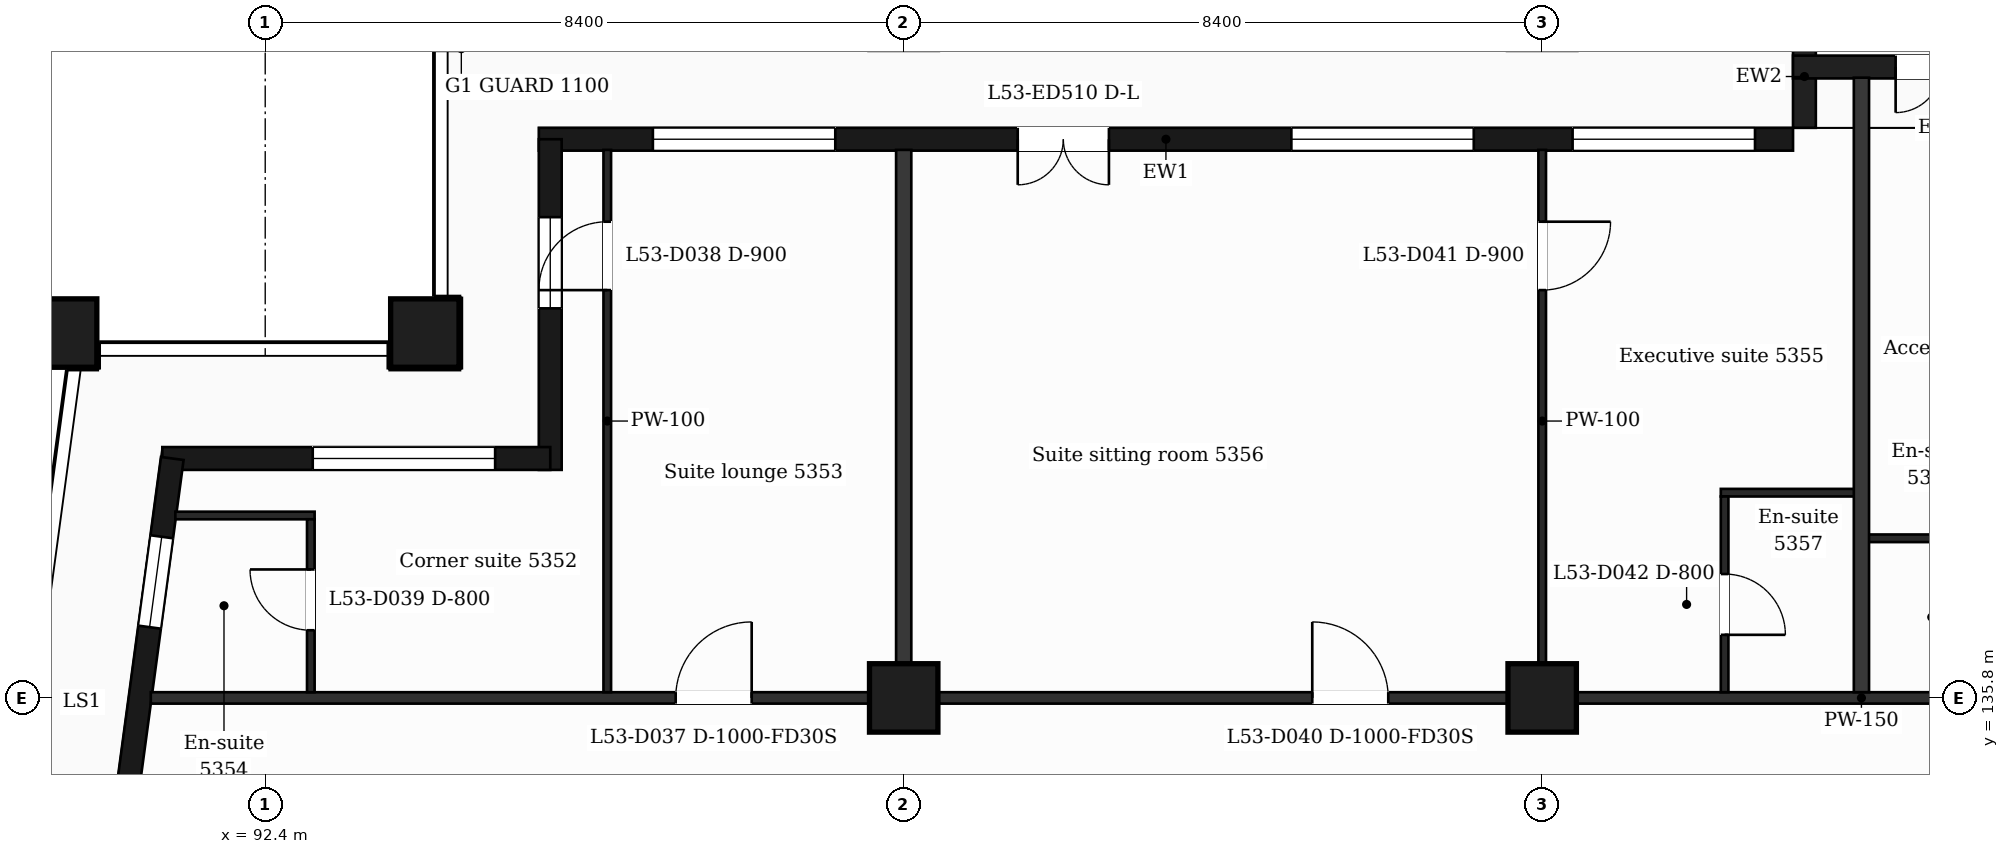
"""IFC4 building model, lengths in metres.
Left out: names, types, materials, properties, quantities, classifications, styles, units other than length and angle.
Written with IfcOpenShell. Run it as: python <this file> out.ifc"""

import sys

from ifc_helpers import new_model, si_unit, direction, frame, frame_2d, origin, origin_2d, place, context, subcontext, project, spatial, rectangle, extrude, element, fill, save


model = new_model("IFC4")
c1 = context("Model", 3, precision=1e-05, world=origin(), true_north=direction((0.0, 1.0)))
c2 = subcontext(c1, "Body", "Model", "MODEL_VIEW")
j1 = project(units=[si_unit("LENGTHUNIT", "METRE"), si_unit("PLANEANGLEUNIT", "RADIAN")], contexts=[c1])
p1 = place(None, origin())
s1 = spatial("IfcSite", under=j1, at=p1, CompositionType="ELEMENT")
p2 = place(p1, origin())
s2 = spatial("IfcBuilding", under=s1, at=p2, CompositionType="ELEMENT")
p3 = place(p2, frame((0.0, 0.0, 220.7)))
s3 = spatial("IfcBuildingStorey", under=s2, at=p3, CompositionType="ELEMENT", Elevation=220.7)
for number, where, z_axis, x_axis in (
    (1, (94.5, 140.6, 0.0), (0.0, 0.0, 1.0), (1.0, 0.0, 0.0)),
    (2, (89.735, 140.6, 0.0), (0.0, 0.0, 1.0), (1.0, 0.0, 0.0)),
    (3, (100.8, 135.8, 0.0), (0.0, 0.0, 1.0), (1.0, 0.0, 0.0)),
    (4, (109.2, 135.8, 0.0), (0.0, 0.0, 1.0), (1.0, 0.0, 0.0)),
):
    element("IfcColumn", number, at=place(p3, frame(where, z_axis=z_axis, x_axis=x_axis)), inside=s3, PredefinedType="COLUMN", context=c2, shape_type="SweptSolid", body=[
        extrude(rectangle(XDim=0.9, YDim=0.9, at=origin_2d()), origin(), (0.0, 0.0, 1.0), 3.7),
    ])
p4 = place(p3, frame((112.5, 143.15, 0.0), z_axis=(0.0, 0.0, 1.0), x_axis=(-1.0, 0.0, 0.0)))
e5 = element("IfcWall", 5, at=p4, inside=s3, PredefinedType="SOLIDWALL", context=c2, shape_type="SweptSolid", body=[
    extrude(rectangle(XDim=16.5, YDim=0.3, at=frame_2d((8.25, 0.0))), origin(), (0.0, 0.0, 1.0), 3.38),
])
p5 = place(p4, frame((0.5, 0.0, 0.9)))
e6 = element("IfcOpeningElement", 6, at=p5, cuts=e5, PredefinedType="OPENING", context=c2, shape_type="SweptSolid", body=[
    extrude(rectangle(XDim=2.4, YDim=2.1, at=frame_2d((1.2, 1.05))), frame((0.0, 0.16, 0.0), z_axis=(0.0, -1.0, 0.0), x_axis=(1.0, 0.0, 0.0)), (0.0, 0.0, 1.0), 0.32),
])
p6 = place(p4, frame((4.2, 0.0, 0.9)))
e7 = element("IfcOpeningElement", 7, at=p6, cuts=e5, PredefinedType="OPENING", context=c2, shape_type="SweptSolid", body=[
    extrude(rectangle(XDim=2.4, YDim=2.1, at=frame_2d((1.2, 1.05))), frame((0.0, 0.16, 0.0), z_axis=(0.0, -1.0, 0.0), x_axis=(1.0, 0.0, 0.0)), (0.0, 0.0, 1.0), 0.32),
])
p7 = place(p4, frame((9.0, 0.0, 0.0)))
e8 = element("IfcOpeningElement", 8, at=p7, cuts=e5, PredefinedType="OPENING", context=c2, shape_type="SweptSolid", body=[
    extrude(rectangle(XDim=1.2, YDim=2.4, at=frame_2d((0.6, 1.2))), frame((0.0, 0.16, 0.0), z_axis=(0.0, -1.0, 0.0), x_axis=(1.0, 0.0, 0.0)), (0.0, 0.0, 1.0), 0.32),
])
p8 = place(p4, frame((12.6, 0.0, 0.9)))
e9 = element("IfcOpeningElement", 9, at=p8, cuts=e5, PredefinedType="OPENING", context=c2, shape_type="SweptSolid", body=[
    extrude(rectangle(XDim=2.4, YDim=2.1, at=frame_2d((1.2, 1.05))), frame((0.0, 0.16, 0.0), z_axis=(0.0, -1.0, 0.0), x_axis=(1.0, 0.0, 0.0)), (0.0, 0.0, 1.0), 0.32),
])
p9 = place(p3, frame((112.65, 143.3, 0.0), z_axis=(0.0, 0.0, 1.0), x_axis=(0.0, 1.0, 0.0)))
e10 = element("IfcWall", 10, at=p9, inside=s3, PredefinedType="SOLIDWALL", context=c2, shape_type="SweptSolid", body=[
    extrude(rectangle(XDim=1.35, YDim=0.3, at=frame_2d((0.675, 0.0))), origin(), (0.0, 0.0, 1.0), 3.38),
])
p10 = place(p3, frame((116.4, 144.1, 0.0), z_axis=(0.0, 0.0, 1.0), x_axis=(-1.0, 0.0, 0.0)))
e11 = element("IfcWall", 11, at=p10, inside=s3, PredefinedType="SOLIDWALL", context=c2, shape_type="SweptSolid", body=[
    extrude(rectangle(XDim=3.9, YDim=0.3, at=frame_2d((1.95, 0.0))), origin(), (0.0, 0.0, 1.0), 3.38),
])
p11 = place(p10, frame((1.35, 0.0, 0.0)))
e12 = element("IfcOpeningElement", 12, at=p11, cuts=e11, PredefinedType="OPENING", context=c2, shape_type="SweptSolid", body=[
    extrude(rectangle(XDim=1.2, YDim=2.4, at=frame_2d((0.6, 1.2))), frame((0.0, 0.16, 0.0), z_axis=(0.0, -1.0, 0.0), x_axis=(1.0, 0.0, 0.0)), (0.0, 0.0, 1.0), 0.32),
])
p12 = place(p3, frame((96.15, 143.15, 0.0), z_axis=(0.0, 0.0, 1.0), x_axis=(0.0, -1.0, 0.0)))
e13 = element("IfcWall", 13, at=p12, inside=s3, PredefinedType="SOLIDWALL", context=c2, shape_type="SweptSolid", body=[
    extrude(rectangle(XDim=4.35, YDim=0.3, at=frame_2d((2.175, 0.0))), origin(), (0.0, 0.0, 1.0), 3.38),
])
p13 = place(p12, frame((1.025, 0.0, 0.9)))
e14 = element("IfcOpeningElement", 14, at=p13, cuts=e13, PredefinedType="OPENING", context=c2, shape_type="SweptSolid", body=[
    extrude(rectangle(XDim=1.2, YDim=2.1, at=frame_2d((0.6, 1.05))), frame((0.0, 0.16, 0.0), z_axis=(0.0, -1.0, 0.0), x_axis=(1.0, 0.0, 0.0)), (0.0, 0.0, 1.0), 0.32),
])
p14 = place(p3, frame((96.15, 138.95, 0.0), z_axis=(0.0, 0.0, 1.0), x_axis=(-1.0, 0.0, 0.0)))
e15 = element("IfcWall", 15, at=p14, inside=s3, PredefinedType="SOLIDWALL", context=c2, shape_type="SweptSolid", body=[
    extrude(rectangle(XDim=5.104, YDim=0.3, at=frame_2d((2.552, 0.0))), origin(), (0.0, 0.0, 1.0), 3.38),
])
p15 = place(p14, frame((0.725, 0.0, 0.9)))
e16 = element("IfcOpeningElement", 16, at=p15, cuts=e15, PredefinedType="OPENING", context=c2, shape_type="SweptSolid", body=[
    extrude(rectangle(XDim=2.4, YDim=2.1, at=frame_2d((1.2, 1.05))), frame((0.0, 0.16, 0.0), z_axis=(0.0, -1.0, 0.0), x_axis=(1.0, 0.0, 0.0)), (0.0, 0.0, 1.0), 0.32),
])
p16 = place(p3, frame((91.177, 138.95, 0.0), z_axis=(0.0, 0.0, 1.0), x_axis=(-0.133426664613, -0.991058689065, 0.0)))
e17 = element("IfcWall", 17, at=p16, inside=s3, PredefinedType="SOLIDWALL", context=c2, shape_type="SweptSolid", body=[
    extrude(rectangle(XDim=6.609, YDim=0.3, at=frame_2d((3.305, 0.0))), origin(), (0.0, 0.0, 1.0), 3.38),
])
p17 = place(p16, frame((1.039, 0.0, 0.9)))
e18 = element("IfcOpeningElement", 18, at=p17, cuts=e17, PredefinedType="OPENING", context=c2, shape_type="SweptSolid", body=[
    extrude(rectangle(XDim=1.2, YDim=2.1, at=frame_2d((0.6, 1.05))), frame((0.0, 0.16, 0.0), z_axis=(0.0, -1.0, 0.0), x_axis=(1.0, 0.0, 0.0)), (0.0, 0.0, 1.0), 0.32),
])
p18 = place(p16, frame((4.294, 0.0, 0.0)))
e19 = element("IfcOpeningElement", 19, at=p18, cuts=e17, PredefinedType="OPENING", context=c2, shape_type="SweptSolid", body=[
    extrude(rectangle(XDim=1.2, YDim=2.4, at=frame_2d((0.6, 1.2))), frame((0.0, 0.16, 0.0), z_axis=(0.0, -1.0, 0.0), x_axis=(1.0, 0.0, 0.0)), (0.0, 0.0, 1.0), 0.32),
])
p19 = place(p3, frame((90.895, 135.8, 0.0), z_axis=(0.0, 0.0, 1.0), x_axis=(1.0, 0.0, 0.0)))
e20 = element("IfcWall", 20, at=p19, inside=s3, PredefinedType="PARTITIONING", context=c2, shape_type="SweptSolid", body=[
    extrude(rectangle(XDim=45.011, YDim=0.15, at=frame_2d((22.505, 0.0))), origin(), (0.0, 0.0, 1.0), 3.38),
])
p20 = place(p19, frame((6.906, 0.0, 0.0)))
e21 = element("IfcOpeningElement", 21, at=p20, cuts=e20, PredefinedType="OPENING", context=c2, shape_type="SweptSolid", body=[
    extrude(rectangle(XDim=1.0, YDim=2.1, at=frame_2d((0.5, 1.05))), frame((0.0, 0.085, 0.0), z_axis=(0.0, -1.0, 0.0), x_axis=(1.0, 0.0, 0.0)), (0.0, 0.0, 1.0), 0.17),
])
p21 = place(p19, frame((15.281, 0.0, 0.0)))
e22 = element("IfcOpeningElement", 22, at=p21, cuts=e20, PredefinedType="OPENING", context=c2, shape_type="SweptSolid", body=[
    extrude(rectangle(XDim=1.0, YDim=2.1, at=frame_2d((0.5, 1.05))), frame((0.0, 0.085, 0.0), z_axis=(0.0, -1.0, 0.0), x_axis=(1.0, 0.0, 0.0)), (0.0, 0.0, 1.0), 0.17),
])
p22 = place(p19, frame((25.045, 0.0, 0.0)))
e23 = element("IfcOpeningElement", 23, at=p22, cuts=e20, PredefinedType="OPENING", context=c2, shape_type="SweptSolid", body=[
    extrude(rectangle(XDim=1.0, YDim=2.1, at=frame_2d((0.5, 1.05))), frame((0.0, 0.085, 0.0), z_axis=(0.0, -1.0, 0.0), x_axis=(1.0, 0.0, 0.0)), (0.0, 0.0, 1.0), 0.17),
])
p23 = place(p19, frame((29.531, 0.0, 0.0)))
e24 = element("IfcOpeningElement", 24, at=p23, cuts=e20, PredefinedType="OPENING", context=c2, shape_type="SweptSolid", body=[
    extrude(rectangle(XDim=0.95, YDim=2.1, at=frame_2d((0.475, 1.05))), frame((0.0, 0.085, 0.0), z_axis=(0.0, -1.0, 0.0), x_axis=(1.0, 0.0, 0.0)), (0.0, 0.0, 1.0), 0.17),
])
p24 = place(p19, frame((36.906, 0.0, 0.0)))
e25 = element("IfcOpeningElement", 25, at=p24, cuts=e20, PredefinedType="OPENING", context=c2, shape_type="SweptSolid", body=[
    extrude(rectangle(XDim=1.0, YDim=2.1, at=frame_2d((0.5, 1.05))), frame((0.0, 0.085, 0.0), z_axis=(0.0, -1.0, 0.0), x_axis=(1.0, 0.0, 0.0)), (0.0, 0.0, 1.0), 0.17),
])
p25 = place(p3, frame((113.4, 137.9, 0.0), z_axis=(0.0, 0.0, 1.0), x_axis=(1.0, 0.0, 0.0)))
e26 = element("IfcWall", 26, at=p25, inside=s3, PredefinedType="PARTITIONING", context=c2, shape_type="SweptSolid", body=[
    extrude(rectangle(XDim=1.85, YDim=0.1, at=frame_2d((0.925, 0.0))), origin(), (0.0, 0.0, 1.0), 3.38),
])
p26 = place(p3, frame((91.218, 138.2, 0.0), z_axis=(0.0, 0.0, 1.0), x_axis=(1.0, 0.0, 0.0)))
e27 = element("IfcWall", 27, at=p26, inside=s3, PredefinedType="PARTITIONING", context=c2, shape_type="SweptSolid", body=[
    extrude(rectangle(XDim=1.832, YDim=0.1, at=frame_2d((0.916, 0.0))), origin(), (0.0, 0.0, 1.0), 3.38),
])
p27 = place(p3, frame((111.55, 138.5, 0.0), z_axis=(0.0, 0.0, 1.0), x_axis=(1.0, 0.0, 0.0)))
e28 = element("IfcWall", 28, at=p27, inside=s3, PredefinedType="PARTITIONING", context=c2, shape_type="SweptSolid", body=[
    extrude(rectangle(XDim=1.85, YDim=0.1, at=frame_2d((0.925, 0.0))), origin(), (0.0, 0.0, 1.0), 3.38),
])
p28 = place(p3, frame((93.0, 135.875, 0.0), z_axis=(0.0, 0.0, 1.0), x_axis=(0.0, 1.0, 0.0)))
e29 = element("IfcWall", 29, at=p28, inside=s3, PredefinedType="PARTITIONING", context=c2, shape_type="SweptSolid", body=[
    extrude(rectangle(XDim=2.275, YDim=0.1, at=frame_2d((1.137, 0.0))), origin(), (0.0, 0.0, 1.0), 3.38),
])
p29 = place(p28, frame((0.815, 0.0, 0.0)))
e30 = element("IfcOpeningElement", 30, at=p29, cuts=e29, PredefinedType="OPENING", context=c2, shape_type="SweptSolid", body=[
    extrude(rectangle(XDim=0.8, YDim=2.1, at=frame_2d((0.4, 1.05))), frame((0.0, 0.06, 0.0), z_axis=(0.0, -1.0, 0.0), x_axis=(1.0, 0.0, 0.0)), (0.0, 0.0, 1.0), 0.12),
])
p30 = place(p3, frame((96.9, 135.875, 0.0), z_axis=(0.0, 0.0, 1.0), x_axis=(0.0, 1.0, 0.0)))
e31 = element("IfcWall", 31, at=p30, inside=s3, PredefinedType="PARTITIONING", context=c2, shape_type="SweptSolid", body=[
    extrude(rectangle(XDim=7.135, YDim=0.1, at=frame_2d((3.567, 0.0))), origin(), (0.0, 0.0, 1.0), 3.38),
])
p31 = place(p30, frame((5.29, 0.0, 0.0)))
e32 = element("IfcOpeningElement", 32, at=p31, cuts=e31, PredefinedType="OPENING", context=c2, shape_type="SweptSolid", body=[
    extrude(rectangle(XDim=0.9, YDim=2.1, at=frame_2d((0.45, 1.05))), frame((0.0, 0.06, 0.0), z_axis=(0.0, -1.0, 0.0), x_axis=(1.0, 0.0, 0.0)), (0.0, 0.0, 1.0), 0.12),
])
p32 = place(p3, frame((100.8, 135.875, 0.0), z_axis=(0.0, 0.0, 1.0), x_axis=(0.0, 1.0, 0.0)))
e33 = element("IfcWall", 33, at=p32, inside=s3, PredefinedType="PARTITIONING", context=c2, shape_type="SweptSolid", body=[
    extrude(rectangle(XDim=7.135, YDim=0.2, at=frame_2d((3.567, 0.0))), origin(), (0.0, 0.0, 1.0), 3.38),
])
p33 = place(p3, frame((109.2, 135.875, 0.0), z_axis=(0.0, 0.0, 1.0), x_axis=(0.0, 1.0, 0.0)))
e34 = element("IfcWall", 34, at=p33, inside=s3, PredefinedType="PARTITIONING", context=c2, shape_type="SweptSolid", body=[
    extrude(rectangle(XDim=7.135, YDim=0.1, at=frame_2d((3.567, 0.0))), origin(), (0.0, 0.0, 1.0), 3.38),
])
p34 = place(p33, frame((5.29, 0.0, 0.0)))
e35 = element("IfcOpeningElement", 35, at=p34, cuts=e34, PredefinedType="OPENING", context=c2, shape_type="SweptSolid", body=[
    extrude(rectangle(XDim=0.9, YDim=2.1, at=frame_2d((0.45, 1.05))), frame((0.0, 0.06, 0.0), z_axis=(0.0, -1.0, 0.0), x_axis=(1.0, 0.0, 0.0)), (0.0, 0.0, 1.0), 0.12),
])
p35 = place(p3, frame((111.6, 135.875, 0.0), z_axis=(0.0, 0.0, 1.0), x_axis=(0.0, 1.0, 0.0)))
e36 = element("IfcWall", 36, at=p35, inside=s3, PredefinedType="PARTITIONING", context=c2, shape_type="SweptSolid", body=[
    extrude(rectangle(XDim=2.575, YDim=0.1, at=frame_2d((1.288, 0.0))), origin(), (0.0, 0.0, 1.0), 3.38),
])
p36 = place(p35, frame((0.755, 0.0, 0.0)))
e37 = element("IfcOpeningElement", 37, at=p36, cuts=e36, PredefinedType="OPENING", context=c2, shape_type="SweptSolid", body=[
    extrude(rectangle(XDim=0.8, YDim=2.1, at=frame_2d((0.4, 1.05))), frame((0.0, 0.06, 0.0), z_axis=(0.0, -1.0, 0.0), x_axis=(1.0, 0.0, 0.0)), (0.0, 0.0, 1.0), 0.12),
])
p37 = place(p3, frame((113.4, 135.875, 0.0), z_axis=(0.0, 0.0, 1.0), x_axis=(0.0, 1.0, 0.0)))
e38 = element("IfcWall", 38, at=p37, inside=s3, PredefinedType="PARTITIONING", context=c2, shape_type="SweptSolid", body=[
    extrude(rectangle(XDim=8.085, YDim=0.2, at=frame_2d((4.042, 0.0))), origin(), (0.0, 0.0, 1.0), 3.38),
])
p38 = place(p5, origin())
e39 = element("IfcWindow", 39, at=p38, inside=s3, PartitioningType="SINGLE_PANEL", PredefinedType="WINDOW", context=c2, shape_type="SweptSolid", body=[
    extrude(rectangle(XDim=2.4, YDim=2.1, at=frame_2d((1.2, 1.05))), frame((0.0, 0.03, 0.0), z_axis=(0.0, -1.0, 0.0), x_axis=(1.0, 0.0, 0.0)), (0.0, 0.0, 1.0), 0.06),
])
fill(e6, e39)
p39 = place(p6, origin())
e40 = element("IfcWindow", 40, at=p39, inside=s3, PartitioningType="SINGLE_PANEL", PredefinedType="WINDOW", context=c2, shape_type="SweptSolid", body=[
    extrude(rectangle(XDim=2.4, YDim=2.1, at=frame_2d((1.2, 1.05))), frame((0.0, 0.03, 0.0), z_axis=(0.0, -1.0, 0.0), x_axis=(1.0, 0.0, 0.0)), (0.0, 0.0, 1.0), 0.06),
])
fill(e7, e40)
p40 = place(p7, origin())
e41 = element("IfcDoor", 41, at=p40, inside=s3, OperationType="DOUBLE_DOOR_SINGLE_SWING", PredefinedType="DOOR", context=c2, shape_type="SweptSolid", body=[
    extrude(rectangle(XDim=1.2, YDim=2.4, at=frame_2d((0.6, 1.2))), frame((0.0, 0.025, 0.0), z_axis=(0.0, -1.0, 0.0), x_axis=(1.0, 0.0, 0.0)), (0.0, 0.0, 1.0), 0.05),
])
fill(e8, e41)
p41 = place(p8, origin())
e42 = element("IfcWindow", 42, at=p41, inside=s3, PartitioningType="SINGLE_PANEL", PredefinedType="WINDOW", context=c2, shape_type="SweptSolid", body=[
    extrude(rectangle(XDim=2.4, YDim=2.1, at=frame_2d((1.2, 1.05))), frame((0.0, 0.03, 0.0), z_axis=(0.0, -1.0, 0.0), x_axis=(1.0, 0.0, 0.0)), (0.0, 0.0, 1.0), 0.06),
])
fill(e9, e42)
p42 = place(p11, origin())
e43 = element("IfcDoor", 43, at=p42, inside=s3, OperationType="DOUBLE_DOOR_SINGLE_SWING", PredefinedType="DOOR", context=c2, shape_type="SweptSolid", body=[
    extrude(rectangle(XDim=1.2, YDim=2.4, at=frame_2d((0.6, 1.2))), frame((0.0, 0.025, 0.0), z_axis=(0.0, -1.0, 0.0), x_axis=(1.0, 0.0, 0.0)), (0.0, 0.0, 1.0), 0.05),
])
fill(e12, e43)
p43 = place(p13, origin())
e44 = element("IfcWindow", 44, at=p43, inside=s3, PartitioningType="SINGLE_PANEL", PredefinedType="WINDOW", context=c2, shape_type="SweptSolid", body=[
    extrude(rectangle(XDim=1.2, YDim=2.1, at=frame_2d((0.6, 1.05))), frame((0.0, 0.03, 0.0), z_axis=(0.0, -1.0, 0.0), x_axis=(1.0, 0.0, 0.0)), (0.0, 0.0, 1.0), 0.06),
])
fill(e14, e44)
p44 = place(p15, origin())
e45 = element("IfcWindow", 45, at=p44, inside=s3, PartitioningType="SINGLE_PANEL", PredefinedType="WINDOW", context=c2, shape_type="SweptSolid", body=[
    extrude(rectangle(XDim=2.4, YDim=2.1, at=frame_2d((1.2, 1.05))), frame((0.0, 0.03, 0.0), z_axis=(0.0, -1.0, 0.0), x_axis=(1.0, 0.0, 0.0)), (0.0, 0.0, 1.0), 0.06),
])
fill(e16, e45)
p45 = place(p17, origin())
e46 = element("IfcWindow", 46, at=p45, inside=s3, PartitioningType="SINGLE_PANEL", PredefinedType="WINDOW", context=c2, shape_type="SweptSolid", body=[
    extrude(rectangle(XDim=1.2, YDim=2.1, at=frame_2d((0.6, 1.05))), frame((0.0, 0.03, 0.0), z_axis=(0.0, -1.0, 0.0), x_axis=(1.0, 0.0, 0.0)), (0.0, 0.0, 1.0), 0.06),
])
fill(e18, e46)
p46 = place(p20, origin())
e47 = element("IfcDoor", 47, at=p46, inside=s3, OperationType="SINGLE_SWING_RIGHT", PredefinedType="DOOR", context=c2, shape_type="SweptSolid", body=[
    extrude(rectangle(XDim=1.0, YDim=2.1, at=frame_2d((0.5, 1.05))), frame((0.0, 0.025, 0.0), z_axis=(0.0, -1.0, 0.0), x_axis=(1.0, 0.0, 0.0)), (0.0, 0.0, 1.0), 0.05),
])
fill(e21, e47)
p47 = place(p31, origin())
e48 = element("IfcDoor", 48, at=p47, inside=s3, OperationType="SINGLE_SWING_LEFT", PredefinedType="DOOR", context=c2, shape_type="SweptSolid", body=[
    extrude(rectangle(XDim=0.9, YDim=2.1, at=frame_2d((0.45, 1.05))), frame((0.0, 0.025, 0.0), z_axis=(0.0, -1.0, 0.0), x_axis=(1.0, 0.0, 0.0)), (0.0, 0.0, 1.0), 0.05),
])
fill(e32, e48)
p48 = place(p29, origin())
e49 = element("IfcDoor", 49, at=p48, inside=s3, OperationType="SINGLE_SWING_RIGHT", PredefinedType="DOOR", context=c2, shape_type="SweptSolid", body=[
    extrude(rectangle(XDim=0.8, YDim=2.1, at=frame_2d((0.4, 1.05))), frame((0.0, 0.025, 0.0), z_axis=(0.0, -1.0, 0.0), x_axis=(1.0, 0.0, 0.0)), (0.0, 0.0, 1.0), 0.05),
])
fill(e30, e49)
p49 = place(p21, origin())
e50 = element("IfcDoor", 50, at=p49, inside=s3, OperationType="SINGLE_SWING_LEFT", PredefinedType="DOOR", context=c2, shape_type="SweptSolid", body=[
    extrude(rectangle(XDim=1.0, YDim=2.1, at=frame_2d((0.5, 1.05))), frame((0.0, 0.025, 0.0), z_axis=(0.0, -1.0, 0.0), x_axis=(1.0, 0.0, 0.0)), (0.0, 0.0, 1.0), 0.05),
])
fill(e22, e50)
p50 = place(p34, origin())
e51 = element("IfcDoor", 51, at=p50, inside=s3, OperationType="SINGLE_SWING_RIGHT", PredefinedType="DOOR", context=c2, shape_type="SweptSolid", body=[
    extrude(rectangle(XDim=0.9, YDim=2.1, at=frame_2d((0.45, 1.05))), frame((0.0, 0.025, 0.0), z_axis=(0.0, -1.0, 0.0), x_axis=(1.0, 0.0, 0.0)), (0.0, 0.0, 1.0), 0.05),
])
fill(e35, e51)
p51 = place(p36, origin())
e52 = element("IfcDoor", 52, at=p51, inside=s3, OperationType="SINGLE_SWING_LEFT", PredefinedType="DOOR", context=c2, shape_type="SweptSolid", body=[
    extrude(rectangle(XDim=0.8, YDim=2.1, at=frame_2d((0.4, 1.05))), frame((0.0, 0.025, 0.0), z_axis=(0.0, -1.0, 0.0), x_axis=(1.0, 0.0, 0.0)), (0.0, 0.0, 1.0), 0.05),
])
fill(e37, e52)
save(model, sys.argv[1])
